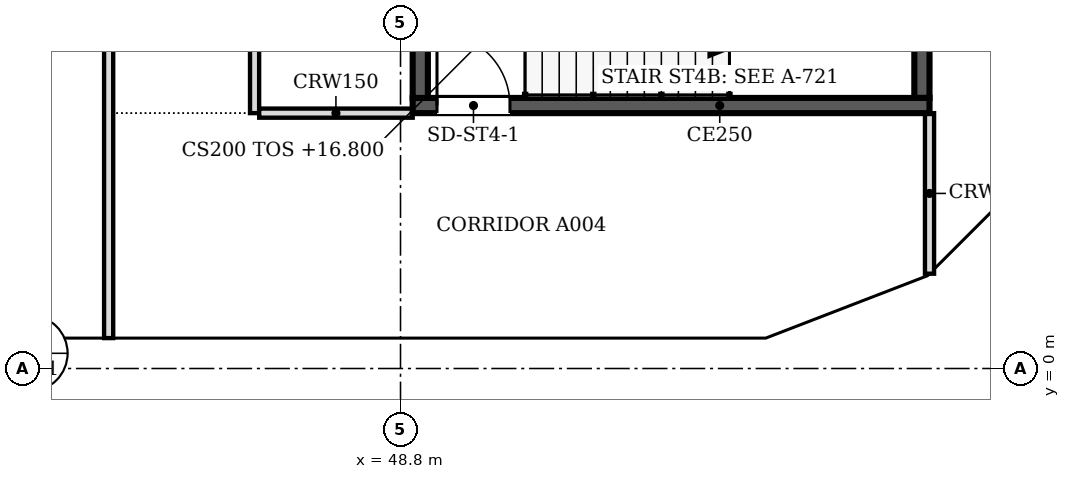
"""IFC4 building model, lengths in metres.
Left out: names, types, materials, properties, quantities, classifications, styles, units other than length and angle.
Written with IfcOpenShell. Run it as: python <this file> out.ifc"""

import sys

from ifc_helpers import new_model, si_unit, direction, frame, frame_2d, origin, place, context, subcontext, project, spatial, polyline, rectangle, outline, extrude, faceted_brep, source, transform, mapped, element, fill, save


model = new_model("IFC4")
c1 = context("Model", 3, precision=1e-05, world=origin(), true_north=direction((0.0, 1.0)))
c2 = subcontext(c1, "Body", "Model", "MODEL_VIEW")
j1 = project(units=[si_unit("LENGTHUNIT", "METRE"), si_unit("PLANEANGLEUNIT", "RADIAN")], contexts=[c1])
p1 = place(None, origin())
s1 = spatial("IfcSite", under=j1, at=p1, CompositionType="ELEMENT")
p2 = place(p1, origin())
s2 = spatial("IfcBuilding", under=s1, at=p2, CompositionType="ELEMENT")
p3 = place(p2, frame((0.0, 0.0, 16.8)))
s3 = spatial("IfcBuildingStorey", under=s2, at=p3, CompositionType="ELEMENT", Elevation=16.8)
m1 = source(origin(), c2, "Body", "SweptSolid", [
    extrude(outline(polyline([(6.1, 0.0), (3.05, 4.5), (0.0, 0.0), (6.1, 0.0)])), frame((0.0, 0.25, 0.0), z_axis=(0.0, -1.0, 0.0), x_axis=(1.0, 0.0, 0.0)), (0.0, 0.0, 1.0), 0.5),
])
p4 = place(p3, frame((39.65, 0.25, 0.0), z_axis=(0.0, 0.0, 1.0), x_axis=(1.0, 0.0, 0.0)))
e1 = element("IfcWall", 1, at=p4, inside=s3, PredefinedType="SOLIDWALL", context=c2, shape_type="MappedRepresentation", body=[
    mapped(m1, transform((0.0, 0.0, 0.0), scale=1.0)),
])
m2 = source(origin(), c2, "Body", "SweptSolid", [
    extrude(outline(polyline([(5.629, 0.25), (3.05, 4.054), (0.471, 0.25), (5.629, 0.25)])), frame((0.0, 0.26, 0.0), z_axis=(0.0, -1.0, 0.0), x_axis=(1.0, 0.0, 0.0)), (0.0, 0.0, 1.0), 0.52),
])
p5 = place(p4, origin())
e2 = element("IfcOpeningElement", 2, at=p5, cuts=e1, PredefinedType="OPENING", context=c2, shape_type="MappedRepresentation", body=[
    mapped(m2, transform((0.0, 0.0, 0.0), scale=1.0)),
])
p6 = place(p3, frame((45.75, 0.25, 0.0), z_axis=(0.0, 0.0, 1.0), x_axis=(1.0, 0.0, 0.0)))
e3 = element("IfcWall", 3, at=p6, inside=s3, PredefinedType="SOLIDWALL", context=c2, shape_type="MappedRepresentation", body=[
    mapped(m1, transform((0.0, 0.0, 0.0), scale=1.0)),
])
p7 = place(p6, origin())
e4 = element("IfcOpeningElement", 4, at=p7, cuts=e3, PredefinedType="OPENING", context=c2, shape_type="MappedRepresentation", body=[
    mapped(m2, transform((0.0, 0.0, 0.0), scale=1.0)),
])
m3 = source(origin(), c2, "Body", "Brep", [
    faceted_brep([(3.05, -0.25, 4.429), (3.003, -0.25, 4.5), (0.0, -0.25, 0.0), (3.05, -0.25, 0.0), (0.0, 0.25, 0.0), (2.957, 0.25, 4.43), (2.957, 0.25, 0.0), (3.003, 0.0, 4.5)], [[[0, 1, 2, 3]], [[4, 5, 6]], [[7, 1, 0]], [[5, 4, 2, 1, 7]], [[4, 6, 3, 2]], [[3, 6, 5, 7, 0]]]),
])
p8 = place(p3, frame((51.85, 0.25, 0.0), z_axis=(0.0, 0.0, 1.0), x_axis=(1.0, 0.0, 0.0)))
e5 = element("IfcWall", 5, at=p8, inside=s3, PredefinedType="SOLIDWALL", context=c2, shape_type="MappedRepresentation", body=[
    mapped(m3, transform((0.0, 0.0, 0.0), scale=1.0)),
])
m4 = source(origin(), c2, "Body", "SweptSolid", [
    extrude(outline(polyline([(2.803, 3.75), (0.468, 0.25), (2.803, 0.25), (2.803, 3.75)])), frame((0.0, 0.26, 0.0), z_axis=(0.0, -1.0, 0.0), x_axis=(1.0, 0.0, 0.0)), (0.0, 0.0, 1.0), 0.52),
])
p9 = place(p8, origin())
e6 = element("IfcOpeningElement", 6, at=p9, cuts=e5, PredefinedType="OPENING", context=c2, shape_type="MappedRepresentation", body=[
    mapped(m4, transform((0.0, 0.0, 0.0), scale=1.0)),
])
m5 = source(origin(), c2, "Body", "Brep", [
    faceted_brep([(2.997, -0.25, 0.0), (0.047, -0.25, 4.5), (0.0, -0.25, 4.43), (0.0, -0.25, 0.0), (0.093, 0.25, 4.429), (2.944, 0.25, 0.081), (2.944, 0.25, 0.0), (0.093, 0.25, 0.0), (0.047, 0.0, 4.5), (2.997, 0.0, 0.0)], [[[0, 1, 2, 3]], [[4, 5, 6, 7]], [[5, 4, 8, 1, 0, 9]], [[2, 1, 8]], [[7, 6, 9, 0, 3]], [[7, 3, 2, 8, 4]], [[9, 6, 5]]]),
])
p10 = place(p3, frame((54.81, 0.233, 0.0), z_axis=(0.0, 0.0, 1.0), x_axis=(0.932990326376, 0.359901446078, 0.0)))
e7 = element("IfcWall", 7, at=p10, inside=s3, PredefinedType="SOLIDWALL", context=c2, shape_type="MappedRepresentation", body=[
    mapped(m5, transform((0.0, 0.0, 0.0), scale=1.0)),
])
m6 = source(origin(), c2, "Body", "SweptSolid", [
    extrude(outline(polyline([(2.534, 0.25), (0.247, 3.739), (0.247, 0.25), (2.534, 0.25)])), frame((0.0, 0.26, 0.0), z_axis=(0.0, -1.0, 0.0), x_axis=(1.0, 0.0, 0.0)), (0.0, 0.0, 1.0), 0.52),
])
p11 = place(p10, origin())
e8 = element("IfcOpeningElement", 8, at=p11, cuts=e7, PredefinedType="OPENING", context=c2, shape_type="MappedRepresentation", body=[
    mapped(m6, transform((0.0, 0.0, 0.0), scale=1.0)),
])
m7 = source(origin(), c2, "Body", "Brep", [
    faceted_brep([(2.997, -0.25, 4.419), (2.944, -0.25, 4.5), (0.0, -0.25, 0.0), (2.997, -0.25, 0.0), (0.053, 0.25, 0.081), (2.891, 0.25, 4.419), (2.891, 0.25, 0.0), (0.053, 0.25, 0.0), (2.944, 0.0, 4.5), (0.0, 0.0, 0.0)], [[[0, 1, 2, 3]], [[4, 5, 6, 7]], [[8, 1, 0]], [[5, 4, 9, 2, 1, 8]], [[7, 6, 3, 2, 9]], [[7, 9, 4]], [[3, 6, 5, 8, 0]]]),
])
p12 = place(p3, frame((57.606, 1.312, 0.0), z_axis=(0.0, 0.0, 1.0), x_axis=(0.707147509625, 0.707066050402, 0.0)))
e9 = element("IfcWall", 9, at=p12, inside=s3, PredefinedType="SOLIDWALL", context=c2, shape_type="MappedRepresentation", body=[
    mapped(m7, transform((0.0, 0.0, 0.0), scale=1.0)),
])
m8 = source(origin(), c2, "Body", "SweptSolid", [
    extrude(outline(polyline([(2.744, 3.738), (0.462, 0.25), (2.744, 0.25), (2.744, 3.738)])), frame((0.0, 0.26, 0.0), z_axis=(0.0, -1.0, 0.0), x_axis=(1.0, 0.0, 0.0)), (0.0, 0.0, 1.0), 0.52),
])
p13 = place(p12, origin())
e10 = element("IfcOpeningElement", 10, at=p13, cuts=e9, PredefinedType="OPENING", context=c2, shape_type="MappedRepresentation", body=[
    mapped(m8, transform((0.0, 0.0, 0.0), scale=1.0)),
])
p14 = place(p2, frame((0.0, 0.0, 21.3)))
s4 = spatial("IfcBuildingStorey", under=s2, at=p14, CompositionType="ELEMENT", Elevation=21.3)
m9 = source(origin(), c2, "Body", "SweptSolid", [
    extrude(outline(polyline([(3.05, 0.0), (6.1, 4.5), (3.05, 9.0), (0.0, 4.5), (3.05, 0.0)])), frame((0.0, 0.25, 0.0), z_axis=(0.0, -1.0, 0.0), x_axis=(1.0, 0.0, 0.0)), (0.0, 0.0, 1.0), 0.5),
])
p15 = place(p14, frame((42.7, 0.25, -4.5), z_axis=(0.0, 0.0, 1.0), x_axis=(1.0, 0.0, 0.0)))
e11 = element("IfcWall", 11, at=p15, inside=s4, PredefinedType="SOLIDWALL", context=c2, shape_type="MappedRepresentation", body=[
    mapped(m9, transform((0.0, 0.0, 0.0), scale=1.0)),
])
m10 = source(origin(), c2, "Body", "SweptSolid", [
    extrude(outline(polyline([(3.05, 0.446), (5.798, 4.5), (3.05, 8.554), (0.302, 4.5), (3.05, 0.446)])), frame((0.0, 0.26, 0.0), z_axis=(0.0, -1.0, 0.0), x_axis=(1.0, 0.0, 0.0)), (0.0, 0.0, 1.0), 0.52),
])
p16 = place(p15, origin())
e12 = element("IfcOpeningElement", 12, at=p16, cuts=e11, PredefinedType="OPENING", context=c2, shape_type="MappedRepresentation", body=[
    mapped(m10, transform((0.0, 0.0, 0.0), scale=1.0)),
])
m11 = source(origin(), c2, "Body", "Brep", [
    faceted_brep([(3.05, -0.25, 0.0), (6.053, -0.25, 4.5), (3.05, -0.25, 9.0), (0.0, -0.25, 4.5), (0.0, 0.25, 4.5), (3.05, 0.25, 9.0), (6.007, 0.25, 4.57), (6.007, 0.25, 4.43), (3.05, 0.25, 0.0), (6.053, 0.0, 4.5)], [[[0, 1, 2, 3]], [[4, 5, 6, 7, 8]], [[8, 7, 9, 1, 0]], [[6, 5, 2, 1, 9]], [[5, 4, 3, 2]], [[4, 8, 0, 3]], [[9, 7, 6]]]),
])
p17 = place(p14, frame((48.8, 0.25, -4.5), z_axis=(0.0, 0.0, 1.0), x_axis=(1.0, 0.0, 0.0)))
e13 = element("IfcWall", 13, at=p17, inside=s4, PredefinedType="SOLIDWALL", context=c2, shape_type="MappedRepresentation", body=[
    mapped(m11, transform((0.0, 0.0, 0.0), scale=1.0)),
])
m12 = source(origin(), c2, "Body", "SweptSolid", [
    extrude(outline(polyline([(3.048, 0.448), (5.753, 4.5), (3.048, 8.552), (0.302, 4.5), (3.048, 0.448)])), frame((0.0, 0.26, 0.0), z_axis=(0.0, -1.0, 0.0), x_axis=(1.0, 0.0, 0.0)), (0.0, 0.0, 1.0), 0.52),
])
p18 = place(p17, origin())
e14 = element("IfcOpeningElement", 14, at=p18, cuts=e13, PredefinedType="OPENING", context=c2, shape_type="MappedRepresentation", body=[
    mapped(m12, transform((0.0, 0.0, 0.0), scale=1.0)),
])
m13 = source(origin(), c2, "Body", "Brep", [
    faceted_brep([(2.95, -0.25, 0.0), (3.003, -0.25, 0.081), (3.003, -0.25, 8.919), (2.95, -0.25, 9.0), (0.0, -0.25, 4.5), (0.047, 0.25, 4.571), (2.898, 0.25, 8.919), (2.898, 0.25, 0.081), (0.047, 0.25, 4.429), (2.95, 0.0, 0.0), (2.95, 0.0, 9.0), (0.0, 0.0, 4.5)], [[[0, 1, 2, 3, 4]], [[5, 6, 7, 8]], [[1, 0, 9]], [[10, 3, 2]], [[6, 5, 11, 4, 3, 10]], [[8, 7, 9, 0, 4, 11]], [[8, 11, 5]], [[1, 9, 7, 6, 10, 2]]]),
])
p19 = place(p14, frame((54.854, 0.25, -4.5), z_axis=(0.0, 0.0, 1.0), x_axis=(0.932970071518, 0.359953949349, 0.0)))
e15 = element("IfcWall", 15, at=p19, inside=s4, PredefinedType="SOLIDWALL", context=c2, shape_type="MappedRepresentation", body=[
    mapped(m13, transform((0.0, 0.0, 0.0), scale=1.0)),
])
m14 = source(origin(), c2, "Body", "SweptSolid", [
    extrude(outline(polyline([(2.75, 8.239), (0.299, 4.5), (2.75, 0.761), (2.75, 8.239)])), frame((0.0, 0.26, 0.0), z_axis=(0.0, -1.0, 0.0), x_axis=(1.0, 0.0, 0.0)), (0.0, 0.0, 1.0), 0.52),
])
p20 = place(p19, origin())
e16 = element("IfcOpeningElement", 16, at=p20, cuts=e15, PredefinedType="OPENING", context=c2, shape_type="MappedRepresentation", body=[
    mapped(m14, transform((0.0, 0.0, 0.0), scale=1.0)),
])
m15 = source(origin(), c2, "Body", "Brep", [
    faceted_brep([(0.053, -0.25, 0.0), (2.997, -0.25, 4.5), (0.053, -0.25, 9.0), (0.0, -0.25, 8.919), (0.0, -0.25, 0.081), (0.106, 0.25, 8.919), (2.944, 0.25, 4.581), (2.944, 0.25, 4.419), (0.106, 0.25, 0.081), (2.997, 0.0, 4.5), (0.053, 0.0, 0.0), (0.053, 0.0, 9.0)], [[[0, 1, 2, 3, 4]], [[5, 6, 7, 8]], [[8, 7, 9, 1, 0, 10]], [[6, 5, 11, 2, 1, 9]], [[3, 2, 11]], [[10, 0, 4]], [[8, 10, 4, 3, 11, 5]], [[9, 7, 6]]]),
])
p21 = place(p14, frame((57.569, 1.274, -4.5), z_axis=(0.0, 0.0, 1.0), x_axis=(0.707066050402, 0.707147509625, 0.0)))
e17 = element("IfcWall", 17, at=p21, inside=s4, PredefinedType="SOLIDWALL", context=c2, shape_type="MappedRepresentation", body=[
    mapped(m15, transform((0.0, 0.0, 0.0), scale=1.0)),
])
m16 = source(origin(), c2, "Body", "SweptSolid", [
    extrude(outline(polyline([(0.253, 0.762), (2.698, 4.5), (0.253, 8.238), (0.253, 0.762)])), frame((0.0, 0.26, 0.0), z_axis=(0.0, -1.0, 0.0), x_axis=(1.0, 0.0, 0.0)), (0.0, 0.0, 1.0), 0.52),
])
p22 = place(p21, origin())
e18 = element("IfcOpeningElement", 18, at=p22, cuts=e17, PredefinedType="OPENING", context=c2, shape_type="MappedRepresentation", body=[
    mapped(m16, transform((0.0, 0.0, 0.0), scale=1.0)),
])
p23 = place(p3, frame((57.5, 4.325, 0.0), z_axis=(0.0, 0.0, 1.0), x_axis=(-1.0, 0.0, 0.0)))
e19 = element("IfcWall", 19, at=p23, inside=s3, PredefinedType="SOLIDWALL", context=c2, shape_type="SweptSolid", body=[
    extrude(rectangle(XDim=8.5, YDim=0.25, at=frame_2d((4.25, 0.0))), origin(), (0.0, 0.0, 1.0), 4.5),
])
m17 = source(origin(), c2, "Body", "SweptSolid", [
    extrude(rectangle(XDim=1.2, YDim=2.1, at=frame_2d((0.6, 1.05))), frame((0.0, 0.135, 0.0), z_axis=(0.0, -1.0, 0.0), x_axis=(1.0, 0.0, 0.0)), (0.0, 0.0, 1.0), 0.27),
])
p24 = place(p23, frame((6.9, 0.0, 0.0)))
e20 = element("IfcOpeningElement", 20, at=p24, cuts=e19, PredefinedType="OPENING", context=c2, shape_type="MappedRepresentation", body=[
    mapped(m17, transform((0.0, 0.0, 0.0), scale=1.0)),
])
for number, where, z_axis, x_axis in (
    (21, (49.125, 4.45, 0.0), (0.0, 0.0, 1.0), (0.0, 1.0, 0.0)),
    (22, (57.375, 7.85, 0.0), (0.0, 0.0, 1.0), (0.0, -1.0, 0.0)),
):
    element("IfcWall", number, at=place(p3, frame(where, z_axis=z_axis, x_axis=x_axis)), inside=s3, PredefinedType="SOLIDWALL", context=c2, shape_type="SweptSolid", body=[
        extrude(rectangle(XDim=3.4, YDim=0.25, at=frame_2d((1.7, 0.0))), origin(), (0.0, 0.0, 1.0), 4.5),
    ])
p25 = place(p3, frame((44.0, 0.5, 0.0), z_axis=(0.0, 0.0, 1.0), x_axis=(0.0, 1.0, 0.0)))
e23 = element("IfcWall", 23, at=p25, inside=s3, PredefinedType="PARTITIONING", context=c2, shape_type="SweptSolid", body=[
    extrude(rectangle(XDim=21.424, YDim=0.15, at=frame_2d((10.712, 0.0))), origin(), (0.0, 0.0, 1.0), 3.415),
])
m18 = source(origin(), c2, "Body", "SweptSolid", [
    extrude(rectangle(XDim=0.9, YDim=2.1, at=frame_2d((0.45, 1.05))), frame((0.0, 0.085, 0.0), z_axis=(0.0, -1.0, 0.0), x_axis=(1.0, 0.0, 0.0)), (0.0, 0.0, 1.0), 0.17),
])
p26 = place(p25, frame((16.601, 0.0, 0.0)))
e24 = element("IfcOpeningElement", 24, at=p26, cuts=e23, PredefinedType="OPENING", context=c2, shape_type="MappedRepresentation", body=[
    mapped(m18, transform((0.0, 0.0, 0.0), scale=1.0)),
])
p27 = place(p25, frame((7.7, 0.0, 0.0)))
e25 = element("IfcOpeningElement", 25, at=p27, cuts=e23, PredefinedType="OPENING", context=c2, shape_type="MappedRepresentation", body=[
    mapped(m18, transform((0.0, 0.0, 0.0), scale=1.0)),
])
p28 = place(p3, frame((57.5, 1.559, 0.0), z_axis=(0.0, 0.0, 1.0), x_axis=(0.0, 1.0, 0.0)))
e26 = element("IfcWall", 26, at=p28, inside=s3, PredefinedType="PARTITIONING", context=c2, shape_type="SweptSolid", body=[
    extrude(rectangle(XDim=2.641, YDim=0.15, at=frame_2d((1.32, 0.0))), origin(), (0.0, 0.0, 1.0), 3.415),
])
p29 = place(p3, frame((46.4, 21.924, 0.0), z_axis=(0.0, 0.0, 1.0), x_axis=(0.0, -1.0, 0.0)))
e27 = element("IfcWall", 27, at=p29, inside=s3, PredefinedType="PARTITIONING", context=c2, shape_type="SweptSolid", body=[
    extrude(rectangle(XDim=17.724, YDim=0.15, at=frame_2d((8.862, 0.0))), origin(), (0.0, 0.0, 1.0), 3.415),
])
p30 = place(p29, frame((3.423, 0.0, 0.0)))
e28 = element("IfcOpeningElement", 28, at=p30, cuts=e27, PredefinedType="OPENING", context=c2, shape_type="MappedRepresentation", body=[
    mapped(m18, transform((0.0, 0.0, 0.0), scale=1.0)),
])
p31 = place(p29, frame((12.324, 0.0, 0.0)))
e29 = element("IfcOpeningElement", 29, at=p31, cuts=e27, PredefinedType="OPENING", context=c2, shape_type="MappedRepresentation", body=[
    mapped(m18, transform((0.0, 0.0, 0.0), scale=1.0)),
])
p32 = place(p3, frame((46.476, 4.2, 0.0), z_axis=(0.0, 0.0, 1.0), x_axis=(1.0, 0.0, 0.0)))
e30 = element("IfcWall", 30, at=p32, inside=s3, PredefinedType="PARTITIONING", context=c2, shape_type="SweptSolid", body=[
    extrude(rectangle(XDim=2.524, YDim=0.15, at=frame_2d((1.262, 0.0))), origin(), (0.0, 0.0, 1.0), 3.415),
])
m19 = source(origin(), c2, "Body", "SweptSolid", [
    extrude(rectangle(XDim=1.2, YDim=2.1, at=frame_2d((0.6, 1.05))), frame((0.0, 0.025, 0.0), z_axis=(0.0, -1.0, 0.0), x_axis=(1.0, 0.0, 0.0)), (0.0, 0.0, 1.0), 0.05),
])
p33 = place(p24, origin())
e31 = element("IfcDoor", 31, at=p33, inside=s3, OperationType="SINGLE_SWING_RIGHT", PredefinedType="DOOR", context=c2, shape_type="MappedRepresentation", body=[
    mapped(m19, transform((0.0, 0.0, 0.0), scale=1.0)),
])
fill(e20, e31)
save(model, sys.argv[1])
